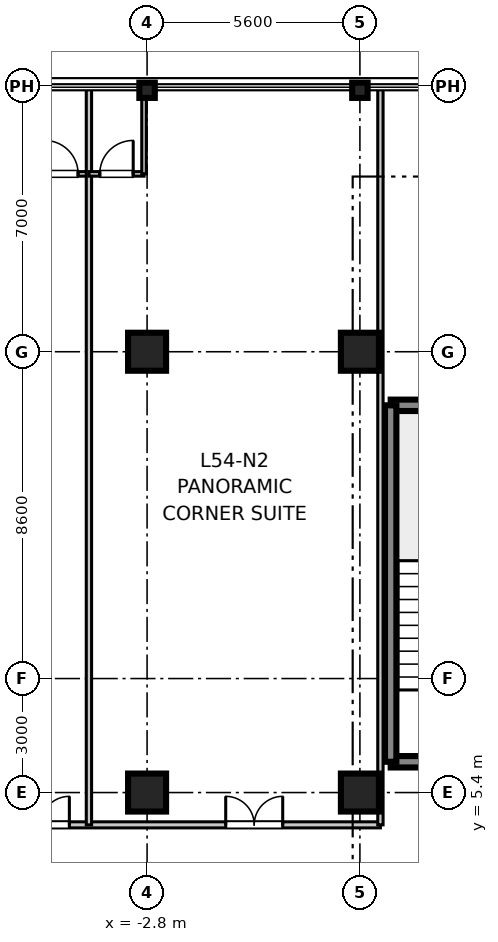
"""IFC4 building model, lengths in metres.
Left out: names, types, materials, properties, quantities, classifications, styles, units other than length and angle.
Written with IfcOpenShell. Run it as: python <this file> out.ifc"""

import sys

from ifc_helpers import new_model, si_unit, direction, frame, frame_2d, origin, origin_2d, place, context, subcontext, project, spatial, rectangle, i_section, extrude, source, transform, mapped, element, fill, save


model = new_model("IFC4")
c1 = context("Model", 3, precision=1e-05, world=origin(), true_north=direction((0.0, 1.0)))
c2 = subcontext(c1, "Body", "Model", "MODEL_VIEW")
j1 = project(units=[si_unit("LENGTHUNIT", "METRE"), si_unit("PLANEANGLEUNIT", "RADIAN")], contexts=[c1])
p1 = place(None, origin())
s1 = spatial("IfcSite", under=j1, at=p1, CompositionType="ELEMENT")
p2 = place(p1, origin())
s2 = spatial("IfcBuilding", under=s1, at=p2, CompositionType="ELEMENT")
p3 = place(p2, frame((0.0, 0.0, 212.3)))
s3 = spatial("IfcBuildingStorey", under=s2, at=p3, CompositionType="ELEMENT", Elevation=212.3)
m1 = source(origin(), c2, "Body", "SweptSolid", [
    extrude(rectangle(XDim=1.0, YDim=1.0, at=origin_2d()), origin(), (0.0, 0.0, 1.0), 3.655),
])
for number, where, z_axis, x_axis in (
    (1, (-2.8, 5.4, 0.0), (0.0, 0.0, 1.0), (1.0, 0.0, 0.0)),
    (2, (-2.8, 17.0, 0.0), (0.0, 0.0, 1.0), (1.0, 0.0, 0.0)),
    (3, (2.8, 5.4, 0.0), (0.0, 0.0, 1.0), (1.0, 0.0, 0.0)),
    (4, (2.8, 17.0, 0.0), (0.0, 0.0, 1.0), (1.0, 0.0, 0.0)),
):
    element("IfcColumn", number, at=place(p3, frame(where, z_axis=z_axis, x_axis=x_axis)), inside=s3, PredefinedType="COLUMN", context=c2, shape_type="MappedRepresentation", body=[
        mapped(m1, transform((0.0, 0.0, 0.0), scale=1.0)),
    ])
m2 = source(origin(), c2, "Body", "SweptSolid", [
    extrude(i_section(OverallWidth=0.401, OverallDepth=0.406, WebThickness=0.016, FlangeThickness=0.025, at=origin_2d()), origin(), (0.0, 0.0, 1.0), 3.655),
])
for number, where, z_axis, x_axis in (
    (5, (-2.8, 23.88, 0.0), (0.0, 0.0, 1.0), (0.0, 1.0, 0.0)),
    (6, (2.8, 23.88, 0.0), (0.0, 0.0, 1.0), (0.0, 1.0, 0.0)),
):
    element("IfcColumn", number, at=place(p3, frame(where, z_axis=z_axis, x_axis=x_axis)), inside=s3, PredefinedType="COLUMN", context=c2, shape_type="MappedRepresentation", body=[
        mapped(m2, transform((0.0, 0.0, 0.0), scale=1.0)),
    ])
m3 = source(origin(), c2, "Body", "SweptSolid", [
    extrude(rectangle(XDim=3.98, YDim=0.3, at=frame_2d((1.99, 0.0))), origin(), (0.0, 0.0, 1.0), 3.41),
])
for number, where, z_axis, x_axis in (
    (7, (3.61, 6.21, 0.0), (0.0, 0.0, 1.0), (1.0, 0.0, 0.0)),
    (8, (3.61, 15.59, 0.0), (0.0, 0.0, 1.0), (1.0, 0.0, 0.0)),
):
    element("IfcWall", number, at=place(p3, frame(where, z_axis=z_axis, x_axis=x_axis)), inside=s3, PredefinedType="SHEAR", context=c2, shape_type="MappedRepresentation", body=[
        mapped(m3, transform((0.0, 0.0, 0.0), scale=1.0)),
    ])
m4 = source(origin(), c2, "Body", "SweptSolid", [
    extrude(rectangle(XDim=9.38, YDim=0.3, at=frame_2d((4.69, 0.0))), origin(), (0.0, 0.0, 1.0), 3.41),
])
p4 = place(p3, frame((3.61, 6.21, 0.0), z_axis=(0.0, 0.0, 1.0), x_axis=(0.0, 1.0, 0.0)))
e9 = element("IfcWall", 9, at=p4, inside=s3, PredefinedType="SHEAR", context=c2, shape_type="MappedRepresentation", body=[
    mapped(m4, transform((0.0, 0.0, 0.0), scale=1.0)),
])
m5 = source(origin(), c2, "Body", "SweptSolid", [
    extrude(rectangle(XDim=15.34, YDim=0.16, at=frame_2d((7.67, 0.0))), origin(), (0.0, 0.0, 1.0), 2.75),
])
p5 = place(p3, frame((-12.0, 4.55, 0.0), z_axis=(0.0, 0.0, 1.0), x_axis=(1.0, 0.0, 0.0)))
e10 = element("IfcWall", 10, at=p5, inside=s3, PredefinedType="PARTITIONING", context=c2, shape_type="MappedRepresentation", body=[
    mapped(m5, transform((0.0, 0.0, 0.0), scale=1.0)),
])
p6 = place(p5, frame((5.655, 0.0, 0.0)))
e11 = element("IfcOpeningElement", 11, at=p6, cuts=e10, PredefinedType="OPENING", context=c2, shape_type="SweptSolid", body=[
    extrude(rectangle(XDim=1.5, YDim=2.15, at=frame_2d((0.75, 1.075))), frame((0.0, 0.09, 0.0), z_axis=(0.0, -1.0, 0.0), x_axis=(1.0, 0.0, 0.0)), (0.0, 0.0, 1.0), 0.18),
])
p7 = place(p5, frame((11.269, 0.0, 0.0)))
e12 = element("IfcOpeningElement", 12, at=p7, cuts=e10, PredefinedType="OPENING", context=c2, shape_type="SweptSolid", body=[
    extrude(rectangle(XDim=1.5, YDim=2.15, at=frame_2d((0.75, 1.075))), frame((0.0, 0.09, 0.0), z_axis=(0.0, -1.0, 0.0), x_axis=(1.0, 0.0, 0.0)), (0.0, 0.0, 1.0), 0.18),
])
m6 = source(origin(), c2, "Body", "SweptSolid", [
    extrude(rectangle(XDim=19.35, YDim=0.14, at=frame_2d((9.675, 0.0))), origin(), (0.0, 0.0, 1.0), 2.75),
])
p8 = place(p3, frame((3.34, 4.55, 0.0), z_axis=(0.0, 0.0, 1.0), x_axis=(0.0, 1.0, 0.0)))
e13 = element("IfcWall", 13, at=p8, inside=s3, PredefinedType="PARTITIONING", context=c2, shape_type="MappedRepresentation", body=[
    mapped(m6, transform((0.0, 0.0, 0.0), scale=1.0)),
])
m7 = source(origin(), c2, "Body", "SweptSolid", [
    extrude(rectangle(XDim=1.45, YDim=0.12, at=frame_2d((0.725, 0.0))), origin(), (0.0, 0.0, 1.0), 2.75),
])
p9 = place(p3, frame((-5.78, 21.68, 0.0), z_axis=(0.0, 0.0, 1.0), x_axis=(1.0, 0.0, 0.0)))
e14 = element("IfcWall", 14, at=p9, inside=s3, PredefinedType="PARTITIONING", context=c2, shape_type="MappedRepresentation", body=[
    mapped(m7, transform((0.0, 0.0, 0.0), scale=1.0)),
])
p10 = place(p9, frame((0.285, 0.0, 0.0)))
e15 = element("IfcOpeningElement", 15, at=p10, cuts=e14, PredefinedType="OPENING", context=c2, shape_type="SweptSolid", body=[
    extrude(rectangle(XDim=0.88, YDim=2.1, at=frame_2d((0.44, 1.05))), frame((0.0, 0.07, 0.0), z_axis=(0.0, -1.0, 0.0), x_axis=(1.0, 0.0, 0.0)), (0.0, 0.0, 1.0), 0.14),
])
p11 = place(p3, frame((-4.33, 4.55, 0.0), z_axis=(0.0, 0.0, 1.0), x_axis=(0.0, 1.0, 0.0)))
e16 = element("IfcWall", 16, at=p11, inside=s3, PredefinedType="PARTITIONING", context=c2, shape_type="MappedRepresentation", body=[
    mapped(m6, transform((0.0, 0.0, 0.0), scale=1.0)),
])
m8 = source(origin(), c2, "Body", "SweptSolid", [
    extrude(rectangle(XDim=1.45, YDim=0.12, at=frame_2d((0.725, 0.0))), origin(), (0.0, 0.0, 1.0), 2.75),
])
p12 = place(p3, frame((-4.33, 21.68, 0.0), z_axis=(0.0, 0.0, 1.0), x_axis=(1.0, 0.0, 0.0)))
e17 = element("IfcWall", 17, at=p12, inside=s3, PredefinedType="PARTITIONING", context=c2, shape_type="MappedRepresentation", body=[
    mapped(m8, transform((0.0, 0.0, 0.0), scale=1.0)),
])
p13 = place(p12, frame((0.285, 0.0, 0.0)))
e18 = element("IfcOpeningElement", 18, at=p13, cuts=e17, PredefinedType="OPENING", context=c2, shape_type="SweptSolid", body=[
    extrude(rectangle(XDim=0.88, YDim=2.1, at=frame_2d((0.44, 1.05))), frame((0.0, 0.07, 0.0), z_axis=(0.0, -1.0, 0.0), x_axis=(1.0, 0.0, 0.0)), (0.0, 0.0, 1.0), 0.14),
])
m9 = source(origin(), c2, "Body", "SweptSolid", [
    extrude(rectangle(XDim=2.22, YDim=0.12, at=frame_2d((1.11, 0.0))), origin(), (0.0, 0.0, 1.0), 2.75),
])
p14 = place(p3, frame((-2.88, 21.68, 0.0), z_axis=(0.0, 0.0, 1.0), x_axis=(0.0, 1.0, 0.0)))
e19 = element("IfcWall", 19, at=p14, inside=s3, PredefinedType="PARTITIONING", context=c2, shape_type="MappedRepresentation", body=[
    mapped(m9, transform((0.0, 0.0, 0.0), scale=1.0)),
])
m10 = source(origin(), c2, "Body", "SweptSolid", [
    extrude(rectangle(XDim=0.88, YDim=2.1, at=frame_2d((0.44, 1.05))), frame((0.0, 0.025, 0.0), z_axis=(0.0, -1.0, 0.0), x_axis=(1.0, 0.0, 0.0)), (0.0, 0.0, 1.0), 0.05),
])
p15 = place(p10, origin())
e20 = element("IfcDoor", 20, at=p15, inside=s3, OperationType="SINGLE_SWING_LEFT", PredefinedType="DOOR", context=c2, shape_type="MappedRepresentation", body=[
    mapped(m10, transform((0.0, 0.0, 0.0), scale=1.0)),
])
fill(e15, e20)
m11 = source(origin(), c2, "Body", "SweptSolid", [
    extrude(rectangle(XDim=1.5, YDim=2.15, at=frame_2d((0.75, 1.075))), frame((0.0, 0.025, 0.0), z_axis=(0.0, -1.0, 0.0), x_axis=(1.0, 0.0, 0.0)), (0.0, 0.0, 1.0), 0.05),
])
p16 = place(p6, origin())
e21 = element("IfcDoor", 21, at=p16, inside=s3, OperationType="DOUBLE_DOOR_SINGLE_SWING", PredefinedType="DOOR", context=c2, shape_type="MappedRepresentation", body=[
    mapped(m11, transform((0.0, 0.0, 0.0), scale=1.0)),
])
fill(e11, e21)
p17 = place(p13, origin())
e22 = element("IfcDoor", 22, at=p17, inside=s3, OperationType="SINGLE_SWING_RIGHT", PredefinedType="DOOR", context=c2, shape_type="MappedRepresentation", body=[
    mapped(m10, transform((0.0, 0.0, 0.0), scale=1.0)),
])
fill(e18, e22)
p18 = place(p7, origin())
e23 = element("IfcDoor", 23, at=p18, inside=s3, OperationType="DOUBLE_DOOR_SINGLE_SWING", PredefinedType="DOOR", context=c2, shape_type="MappedRepresentation", body=[
    mapped(m11, transform((0.0, 0.0, 0.0), scale=1.0)),
])
fill(e12, e23)
save(model, sys.argv[1])
